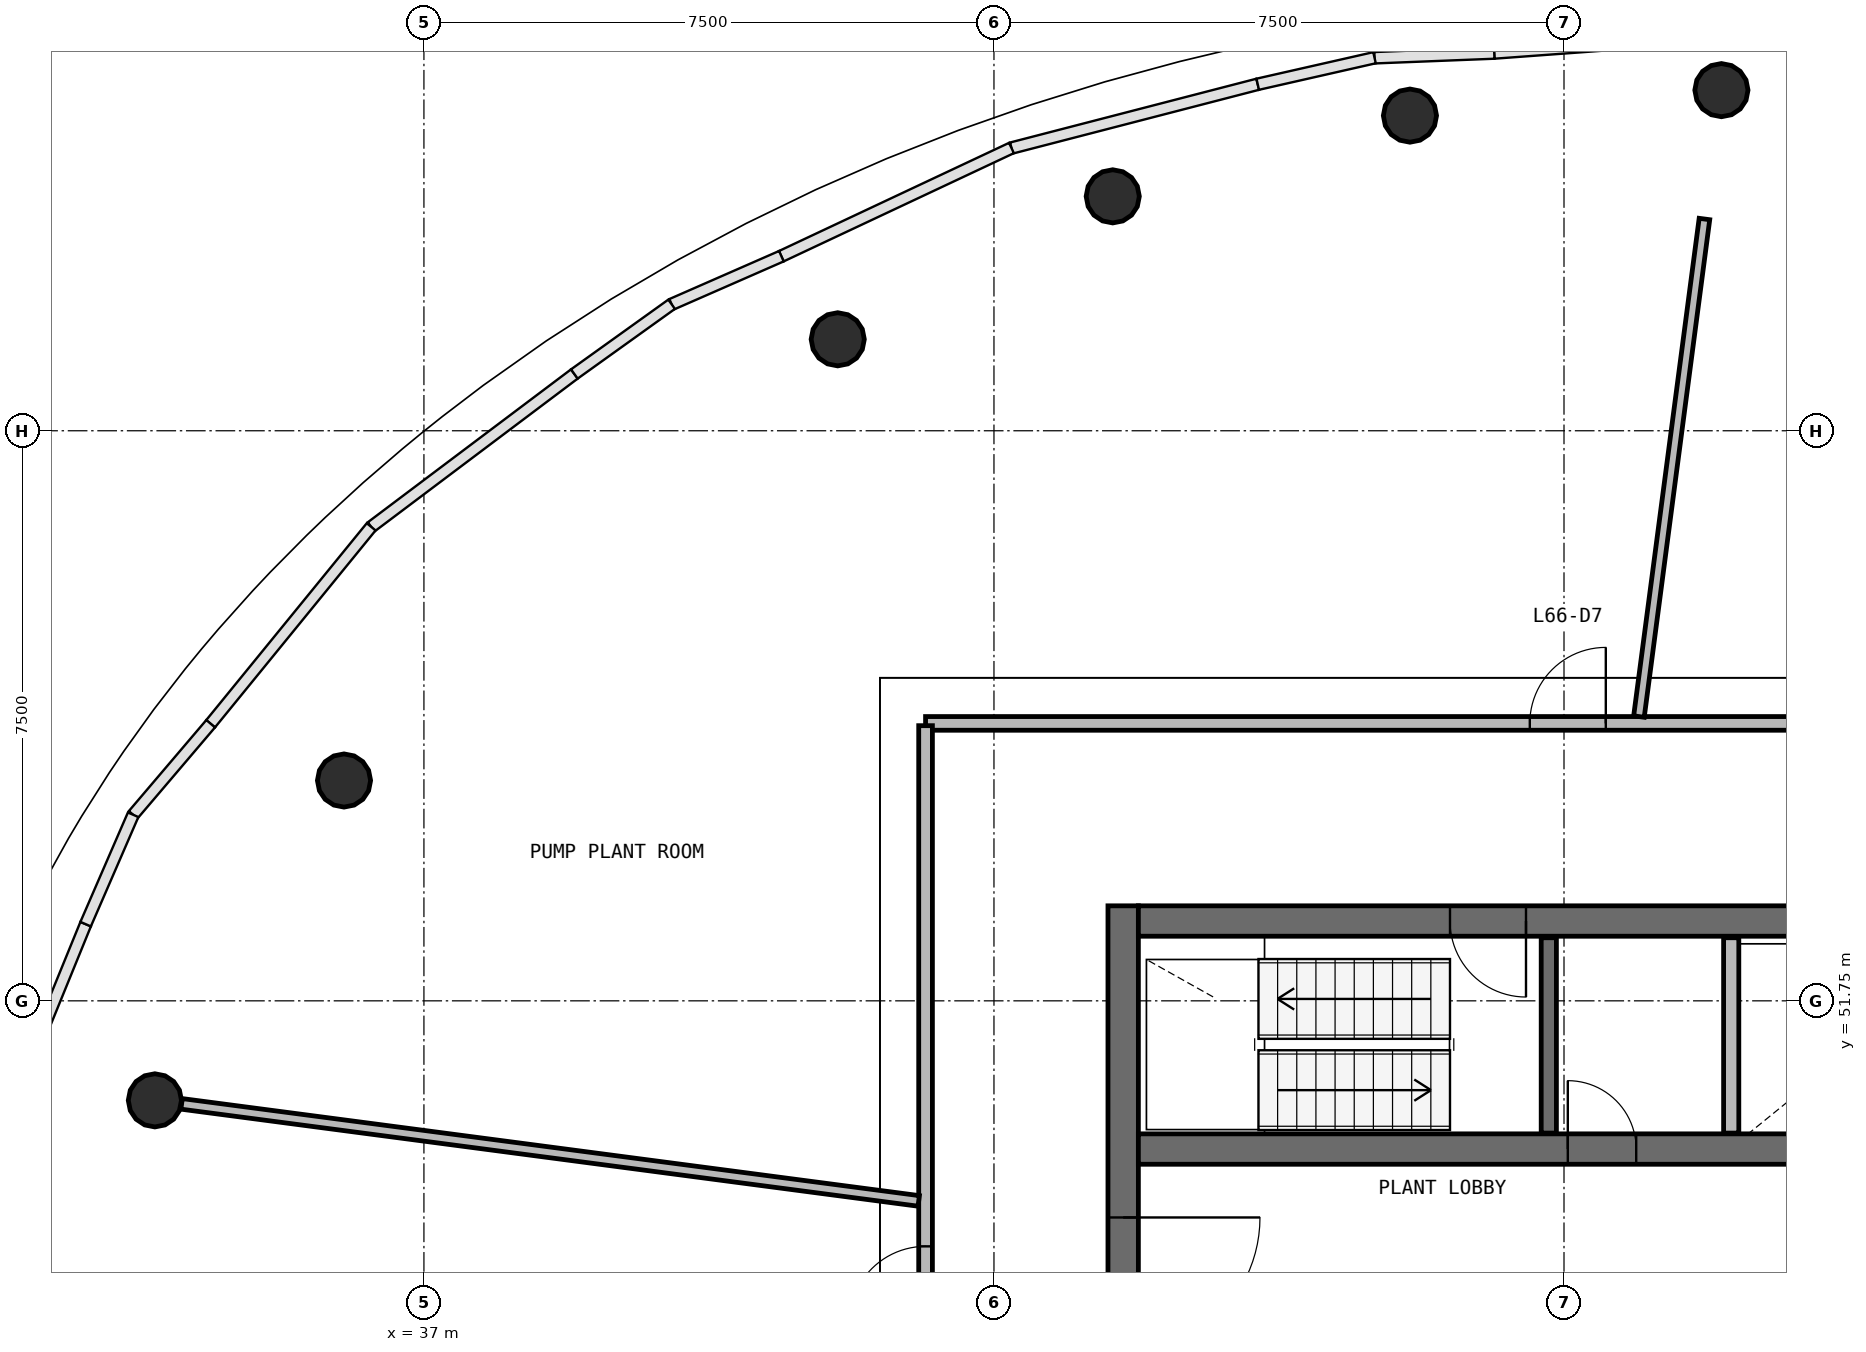
"""IFC4 building model, lengths in metres.
Left out: names, types, materials, properties, quantities, classifications, styles, units other than length and angle.
Written with IfcOpenShell. Run it as: python <this file> out.ifc"""

import sys

from ifc_helpers import new_model, si_unit, direction, frame, frame_2d, origin, origin_2d, place, context, subcontext, project, spatial, rectangle, circle, extrude, source, transform, mapped, element, fill, save


model = new_model("IFC4")
c1 = context("Model", 3, precision=1e-05, world=origin(), true_north=direction((0.0, 1.0)))
c2 = subcontext(c1, "Body", "Model", "MODEL_VIEW")
j1 = project(units=[si_unit("LENGTHUNIT", "METRE"), si_unit("PLANEANGLEUNIT", "RADIAN")], contexts=[c1])
p1 = place(None, origin())
s1 = spatial("IfcSite", under=j1, at=p1, CompositionType="ELEMENT")
p2 = place(p1, origin())
s2 = spatial("IfcBuilding", under=s1, at=p2, CompositionType="ELEMENT")
p3 = place(p2, frame((0.0, 0.0, 269.6)))
s3 = spatial("IfcBuildingStorey", under=s2, at=p3, CompositionType="ELEMENT", Elevation=269.6)
p4 = place(p3, frame((46.2, 53.0, 0.0), z_axis=(0.0, 0.0, 1.0), x_axis=(0.0, -1.0, 0.0)))
e1 = element("IfcWall", 1, at=p4, inside=s3, PredefinedType="SHEAR", context=c2, shape_type="SweptSolid", body=[
    extrude(rectangle(XDim=10.0, YDim=0.4, at=frame_2d((5.0, 0.0))), origin(), (0.0, 0.0, 1.0), 3.5),
])
p5 = place(p4, frame((4.1, 0.0, 0.0)))
e2 = element("IfcOpeningElement", 2, at=p5, cuts=e1, PredefinedType="OPENING", context=c2, shape_type="SweptSolid", body=[
    extrude(rectangle(XDim=1.8, YDim=2.1, at=frame_2d((0.9, 1.05))), frame((0.0, 0.21, 0.0), z_axis=(0.0, -1.0, 0.0), x_axis=(1.0, 0.0, 0.0)), (0.0, 0.0, 1.0), 0.42),
])
p6 = place(p4, frame((7.9, 0.0, 0.0)))
e3 = element("IfcOpeningElement", 3, at=p6, cuts=e1, PredefinedType="OPENING", context=c2, shape_type="SweptSolid", body=[
    extrude(rectangle(XDim=1.0, YDim=2.1, at=frame_2d((0.5, 1.05))), frame((0.0, 0.21, 0.0), z_axis=(0.0, -1.0, 0.0), x_axis=(1.0, 0.0, 0.0)), (0.0, 0.0, 1.0), 0.42),
])
p7 = place(p3, frame((57.6, 52.8, 0.0), z_axis=(0.0, 0.0, 1.0), x_axis=(-1.0, 0.0, 0.0)))
e4 = element("IfcWall", 4, at=p7, inside=s3, PredefinedType="SHEAR", context=c2, shape_type="SweptSolid", body=[
    extrude(rectangle(XDim=11.2, YDim=0.4, at=frame_2d((5.6, 0.0))), origin(), (0.0, 0.0, 1.0), 3.5),
])
p8 = place(p7, frame((6.1, 0.0, 0.0)))
e5 = element("IfcOpeningElement", 5, at=p8, cuts=e4, PredefinedType="OPENING", context=c2, shape_type="SweptSolid", body=[
    extrude(rectangle(XDim=1.0, YDim=2.1, at=frame_2d((0.5, 1.05))), frame((0.0, 0.21, 0.0), z_axis=(0.0, -1.0, 0.0), x_axis=(1.0, 0.0, 0.0)), (0.0, 0.0, 1.0), 0.42),
])
p9 = place(p3, frame((46.4, 49.8, 0.0), z_axis=(0.0, 0.0, 1.0), x_axis=(1.0, 0.0, 0.0)))
e6 = element("IfcWall", 6, at=p9, inside=s3, PredefinedType="SHEAR", context=c2, shape_type="SweptSolid", body=[
    extrude(rectangle(XDim=11.2, YDim=0.4, at=frame_2d((5.6, 0.0))), origin(), (0.0, 0.0, 1.0), 3.5),
])
p10 = place(p9, frame((8.95, 0.0, 0.0)))
e7 = element("IfcOpeningElement", 7, at=p10, cuts=e6, PredefinedType="OPENING", context=c2, shape_type="SweptSolid", body=[
    extrude(rectangle(XDim=1.1, YDim=2.1, at=frame_2d((0.55, 1.05))), frame((0.0, 0.21, 0.0), z_axis=(0.0, -1.0, 0.0), x_axis=(1.0, 0.0, 0.0)), (0.0, 0.0, 1.0), 0.42),
])
p11 = place(p9, frame((5.65, 0.0, 0.0)))
e8 = element("IfcOpeningElement", 8, at=p11, cuts=e6, PredefinedType="OPENING", context=c2, shape_type="SweptSolid", body=[
    extrude(rectangle(XDim=0.9, YDim=2.1, at=frame_2d((0.45, 1.05))), frame((0.0, 0.21, 0.0), z_axis=(0.0, -1.0, 0.0), x_axis=(1.0, 0.0, 0.0)), (0.0, 0.0, 1.0), 0.42),
])
m1 = source(origin(), c2, "Body", "SweptSolid", [
    extrude(circle(Radius=0.35, at=origin_2d()), origin(), (0.0, 0.0, 1.0), 3.784),
])
p12 = place(p3, frame((54.071, 63.731, 0.136), z_axis=(-0.049610189762, -0.377076149752, 0.924852640349), x_axis=(0.991456027497, -0.130441349041, 0.0)))
e9 = element("IfcColumn", 9, at=p12, inside=s3, PredefinedType="COLUMN", context=c2, shape_type="MappedRepresentation", body=[
    mapped(m1, transform((0.0, 0.0, 0.0), scale=1.0)),
])
m2 = source(origin(), c2, "Body", "SweptSolid", [
    extrude(circle(Radius=0.35, at=origin_2d()), origin(), (0.0, 0.0, 1.0), 3.759),
])
p13 = place(p3, frame((49.973, 63.396, 0.131), z_axis=(0.047605122797, -0.361746976777, 0.93106008242), x_axis=(0.991451871974, 0.130472930369, 0.0)))
e10 = element("IfcColumn", 10, at=p13, inside=s3, PredefinedType="COLUMN", context=c2, shape_type="MappedRepresentation", body=[
    mapped(m2, transform((0.0, 0.0, 0.0), scale=1.0)),
])
m3 = source(origin(), c2, "Body", "SweptSolid", [
    extrude(circle(Radius=0.35, at=origin_2d()), origin(), (0.0, 0.0, 1.0), 3.747),
])
p14 = place(p3, frame((46.063, 62.334, 0.128), z_axis=(0.136574670104, -0.329773094178, 0.934129041323), x_axis=(0.923901142315, 0.382631257517, 0.0)))
e11 = element("IfcColumn", 11, at=p14, inside=s3, PredefinedType="COLUMN", context=c2, shape_type="MappedRepresentation", body=[
    mapped(m3, transform((0.0, 0.0, 0.0), scale=1.0)),
])
m4 = source(origin(), c2, "Body", "SweptSolid", [
    extrude(circle(Radius=0.35, at=origin_2d()), origin(), (0.0, 0.0, 1.0), 3.739),
])
p15 = place(p3, frame((42.444, 60.453, 0.126), z_axis=(0.213991301479, -0.278965773549, 0.936154805617), x_axis=(0.793444906834, 0.60864207858, 0.0)))
e12 = element("IfcColumn", 12, at=p15, inside=s3, PredefinedType="COLUMN", context=c2, shape_type="MappedRepresentation", body=[
    mapped(m4, transform((0.0, 0.0, 0.0), scale=1.0)),
])
m5 = source(origin(), c2, "Body", "SweptSolid", [
    extrude(circle(Radius=0.35, at=origin_2d()), origin(), (0.0, 0.0, 1.0), 3.807),
])
p16 = place(p3, frame((35.948, 54.649, 0.141), z_axis=(0.363645996148, -0.150626775693, 0.919278610613), x_axis=(0.382682721486, 0.923879826967, 0.0)))
e13 = element("IfcColumn", 13, at=p16, inside=s3, PredefinedType="COLUMN", context=c2, shape_type="MappedRepresentation", body=[
    mapped(m5, transform((0.0, 0.0, 0.0), scale=1.0)),
])
m6 = source(origin(), c2, "Body", "SweptSolid", [
    extrude(circle(Radius=0.35, at=origin_2d()), origin(), (0.0, 0.0, 1.0), 3.898),
])
p17 = place(p3, frame((33.46, 50.441, 0.157), z_axis=(0.436576513493, -0.057492072785, 0.897828273911), x_axis=(0.13056120367, 0.9914402514, 0.0)))
e14 = element("IfcColumn", 14, at=p17, inside=s3, PredefinedType="COLUMN", context=c2, shape_type="MappedRepresentation", body=[
    mapped(m6, transform((0.0, 0.0, 0.0), scale=1.0)),
])
for number, where, z_axis, x_axis in (
    (15, (51.8, 50.01, 0.0), (0.0, 0.0, 1.0), (0.0, 1.0, 0.0)),
    (16, (54.2, 52.58, 0.0), (0.0, 0.0, 1.0), (0.0, -1.0, 0.0)),
):
    element("IfcWall", number, at=place(p3, frame(where, z_axis=z_axis, x_axis=x_axis)), inside=s3, PredefinedType="SOLIDWALL", context=c2, shape_type="SweptSolid", body=[
        extrude(rectangle(XDim=2.57, YDim=0.2, at=frame_2d((1.285, 0.0))), origin(), (0.0, 0.0, 1.0), 3.22),
    ])
p18 = place(p3, frame((43.6, 55.4, 0.0), z_axis=(0.0, 0.0, 1.0), x_axis=(1.0, 0.0, 0.0)))
e17 = element("IfcWall", 17, at=p18, inside=s3, PredefinedType="PARTITIONING", context=c2, shape_type="SweptSolid", body=[
    extrude(rectangle(XDim=16.8, YDim=0.18, at=frame_2d((8.4, 0.0))), origin(), (0.0, 0.0, 1.0), 2.62),
])
p19 = place(p18, frame((7.95, 0.0, 0.0)))
e18 = element("IfcOpeningElement", 18, at=p19, cuts=e17, PredefinedType="OPENING", context=c2, shape_type="SweptSolid", body=[
    extrude(rectangle(XDim=1.0, YDim=2.1, at=frame_2d((0.5, 1.05))), frame((0.0, 0.1, 0.0), z_axis=(0.0, -1.0, 0.0), x_axis=(1.0, 0.0, 0.0)), (0.0, 0.0, 1.0), 0.2),
])
p20 = place(p3, frame((43.6, 40.63, 0.0), z_axis=(0.0, 0.0, 1.0), x_axis=(0.0, 1.0, 0.0)))
e19 = element("IfcWall", 19, at=p20, inside=s3, PredefinedType="PARTITIONING", context=c2, shape_type="SweptSolid", body=[
    extrude(rectangle(XDim=14.74, YDim=0.18, at=frame_2d((7.37, 0.0))), origin(), (0.0, 0.0, 1.0), 2.62),
])
p21 = place(p20, frame((6.89, 0.0, 0.0)))
e20 = element("IfcOpeningElement", 20, at=p21, cuts=e19, PredefinedType="OPENING", context=c2, shape_type="SweptSolid", body=[
    extrude(rectangle(XDim=1.0, YDim=2.1, at=frame_2d((0.5, 1.05))), frame((0.0, 0.1, 0.0), z_axis=(0.0, -1.0, 0.0), x_axis=(1.0, 0.0, 0.0)), (0.0, 0.0, 1.0), 0.2),
])
p22 = place(p3, frame((43.51, 49.118, 0.0), z_axis=(0.0, 0.0, 1.0), x_axis=(-0.991444523753, 0.130528756683, 0.0)))
e21 = element("IfcWall", 21, at=p22, inside=s3, PredefinedType="PARTITIONING", context=c2, shape_type="SweptSolid", body=[
    extrude(rectangle(XDim=9.782, YDim=0.14, at=frame_2d((4.891, 0.0))), origin(), (0.0, 0.0, 1.0), 2.62),
])
p23 = place(p3, frame((52.986, 55.49, 0.0), z_axis=(0.0, 0.0, 1.0), x_axis=(0.130531034985, 0.9914442238, 0.0)))
e22 = element("IfcWall", 22, at=p23, inside=s3, PredefinedType="PARTITIONING", context=c2, shape_type="SweptSolid", body=[
    extrude(rectangle(XDim=6.602, YDim=0.14, at=frame_2d((3.301, 0.0))), origin(), (0.0, 0.0, 1.0), 2.62),
])
m7 = source(origin(), c2, "Body", "SweptSolid", [
    extrude(rectangle(XDim=1.8, YDim=2.1, at=frame_2d((0.9, 1.05))), frame((0.0, 0.025, 0.0), z_axis=(0.0, -1.0, 0.0), x_axis=(1.0, 0.0, 0.0)), (0.0, 0.0, 1.0), 0.05),
])
p24 = place(p5, origin())
e23 = element("IfcDoor", 23, at=p24, inside=s3, OperationType="SINGLE_SWING_LEFT", PredefinedType="DOOR", context=c2, shape_type="MappedRepresentation", body=[
    mapped(m7, transform((0.0, 0.0, 0.0), scale=1.0)),
])
fill(e2, e23)
m8 = source(origin(), c2, "Body", "SweptSolid", [
    extrude(rectangle(XDim=1.0, YDim=2.1, at=frame_2d((0.5, 1.05))), frame((0.0, 0.025, 0.0), z_axis=(0.0, -1.0, 0.0), x_axis=(1.0, 0.0, 0.0)), (0.0, 0.0, 1.0), 0.05),
])
p25 = place(p8, origin())
e24 = element("IfcDoor", 24, at=p25, inside=s3, OperationType="SINGLE_SWING_LEFT", PredefinedType="DOOR", context=c2, shape_type="MappedRepresentation", body=[
    mapped(m8, transform((0.0, 0.0, 0.0), scale=1.0)),
])
fill(e5, e24)
m9 = source(origin(), c2, "Body", "SweptSolid", [
    extrude(rectangle(XDim=1.0, YDim=2.1, at=frame_2d((0.5, 1.05))), frame((0.0, 0.025, 0.0), z_axis=(0.0, -1.0, 0.0), x_axis=(1.0, 0.0, 0.0)), (0.0, 0.0, 1.0), 0.05),
])
p26 = place(p19, origin())
e25 = element("IfcDoor", 25, at=p26, inside=s3, OperationType="SINGLE_SWING_RIGHT", PredefinedType="DOOR", context=c2, shape_type="MappedRepresentation", body=[
    mapped(m9, transform((0.0, 0.0, 0.0), scale=1.0)),
])
fill(e18, e25)
p27 = place(p21, origin())
e26 = element("IfcDoor", 26, at=p27, inside=s3, OperationType="SINGLE_SWING_LEFT", PredefinedType="DOOR", context=c2, shape_type="MappedRepresentation", body=[
    mapped(m9, transform((0.0, 0.0, 0.0), scale=1.0)),
])
fill(e20, e26)
m10 = source(origin(), c2, "Body", "SweptSolid", [
    extrude(rectangle(XDim=0.9, YDim=2.1, at=frame_2d((0.45, 1.05))), frame((0.0, 0.025, 0.0), z_axis=(0.0, -1.0, 0.0), x_axis=(1.0, 0.0, 0.0)), (0.0, 0.0, 1.0), 0.05),
])
p28 = place(p11, origin())
e27 = element("IfcDoor", 27, at=p28, inside=s3, OperationType="SINGLE_SWING_LEFT", PredefinedType="DOOR", context=c2, shape_type="MappedRepresentation", body=[
    mapped(m10, transform((0.0, 0.0, 0.0), scale=1.0)),
])
fill(e8, e27)
save(model, sys.argv[1])
